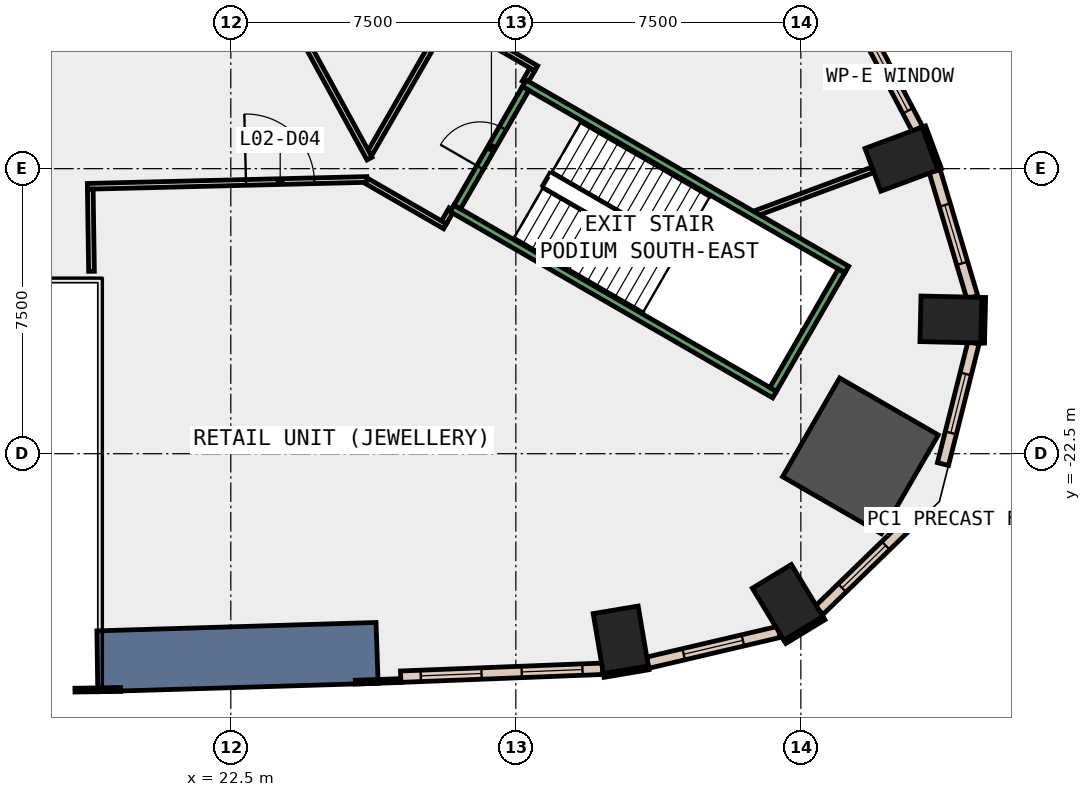
"""IFC4 building model, lengths in metres.
Left out: names, types, materials, properties, quantities, classifications, styles, units other than length and angle.
Written with IfcOpenShell. Run it as: python <this file> out.ifc"""

import sys

from ifc_helpers import new_model, si_unit, direction, frame, frame_2d, origin, origin_2d, place, context, subcontext, project, spatial, polyline, rectangle, outline, extrude, element, fill, save


model = new_model("IFC4")
c1 = context("Model", 3, precision=1e-05, world=origin(), true_north=direction((0.0, 1.0)))
c2 = subcontext(c1, "Body", "Model", "MODEL_VIEW")
j1 = project(units=[si_unit("LENGTHUNIT", "METRE"), si_unit("PLANEANGLEUNIT", "RADIAN")], contexts=[c1])
p1 = place(None, origin())
s1 = spatial("IfcSite", under=j1, at=p1, CompositionType="ELEMENT")
p2 = place(p1, origin())
s2 = spatial("IfcBuilding", under=s1, at=p2, CompositionType="ELEMENT")
p3 = place(p2, frame((0.0, 0.0, 15.0)))
s3 = spatial("IfcBuildingStorey", under=s2, at=p3, CompositionType="ELEMENT", Elevation=15.0)
for number, where, z_axis, x_axis in (
    (1, (32.761, -27.397, -0.45), (0.0, 0.0, 1.0), (0.986, 0.167, 0.0)),
    (2, (37.152, -26.411, -0.45), (0.0, 0.0, 1.0), (0.855, 0.519, 0.0)),
):
    element("IfcColumn", number, at=place(p3, frame(where, z_axis=z_axis, x_axis=x_axis)), inside=s3, PredefinedType="COLUMN", context=c2, shape_type="SweptSolid", body=[
        extrude(rectangle(XDim=1.2, YDim=1.6, at=origin_2d()), origin(), (0.0, 0.0, 1.0), 5.0),
    ])
p4 = place(p3, frame((39.069, -22.556, -0.45), z_axis=(0.0, 0.0, 1.0), x_axis=(-0.866025403784, 0.5, 0.0)))
e3 = element("IfcColumn", 3, at=p4, inside=s3, PredefinedType="COLUMN", context=c2, shape_type="SweptSolid", body=[
    extrude(rectangle(XDim=3.0, YDim=3.0, at=origin_2d()), origin(), (0.0, 0.0, 1.0), 5.0),
])
for number, where, z_axis, x_axis in (
    (4, (41.448, -18.969, -0.45), (0.0, 0.0, 1.0), (0.023, 1.0, 0.0)),
    (5, (40.147, -14.751, -0.45), (0.0, 0.0, 1.0), (-0.348, 0.937, 0.0)),
):
    element("IfcColumn", number, at=place(p3, frame(where, z_axis=z_axis, x_axis=x_axis)), inside=s3, PredefinedType="COLUMN", context=c2, shape_type="SweptSolid", body=[
        extrude(rectangle(XDim=1.2, YDim=1.6, at=origin_2d()), origin(), (0.0, 0.0, 1.0), 5.0),
    ])
p5 = place(p3, frame((0.0, 0.0, -0.45)))
e6 = element("IfcWall", 6, at=p5, inside=s3, PredefinedType="SHEAR", context=c2, shape_type="SweptSolid", body=[
    extrude(outline(polyline([(19.0, -28.762), (26.377, -28.54), (26.321, -26.941), (18.976, -27.162), (19.0, -28.762)])), origin(), (0.0, 0.0, 1.0), 5.0),
])
p6 = place(p3, frame((41.153, -15.018, 0.0), z_axis=(0.0, 0.0, 1.0), x_axis=(-0.348268249601, 0.937394914814, 0.0)))
e7 = element("IfcWall", 7, at=p6, inside=s3, PredefinedType="STANDARD", context=c2, shape_type="SweptSolid", body=[
    extrude(rectangle(XDim=1.2, YDim=0.1, at=frame_2d((0.6, 0.0))), origin(), (0.0, 0.0, 1.0), 4.55),
])
p7 = place(p3, frame((18.399, -28.721, 0.0), z_axis=(0.0, 0.0, 1.0), x_axis=(0.999886724523, 0.015051183404, 0.0)))
e8 = element("IfcWall", 8, at=p7, inside=s3, PredefinedType="STANDARD", context=c2, shape_type="SweptSolid", body=[
    extrude(rectangle(XDim=1.2, YDim=0.1, at=frame_2d((0.6, 0.0))), origin(), (0.0, 0.0, 1.0), 4.55),
])
p8 = place(p3, frame((25.776, -28.511, 0.0), z_axis=(0.0, 0.0, 1.0), x_axis=(0.999387493042, 0.034994838926, 0.0)))
e9 = element("IfcWall", 9, at=p8, inside=s3, PredefinedType="STANDARD", context=c2, shape_type="SweptSolid", body=[
    extrude(rectangle(XDim=1.2, YDim=0.1, at=frame_2d((0.6, 0.0))), origin(), (0.0, 0.0, 1.0), 4.55),
])
p9 = place(p3, frame((32.311, -28.335, 0.0), z_axis=(0.0, 0.0, 1.0), x_axis=(0.986011774526, 0.166675674579, 0.0)))
e10 = element("IfcWall", 10, at=p9, inside=s3, PredefinedType="STANDARD", context=c2, shape_type="SweptSolid", body=[
    extrude(rectangle(XDim=1.2, YDim=0.1, at=frame_2d((0.6, 0.0))), origin(), (0.0, 0.0, 1.0), 4.55),
])
for number, where, z_axis, x_axis in (
    (11, (37.08, -27.449, 0.0), (0.0, 0.0, 1.0), (0.855, 0.519, 0.0)),
    (12, (42.284, -19.588, 0.0), (0.0, 0.0, 1.0), (0.023, 1.0, 0.0)),
):
    element("IfcWall", number, at=place(p3, frame(where, z_axis=z_axis, x_axis=x_axis)), inside=s3, PredefinedType="STANDARD", context=c2, shape_type="SweptSolid", body=[
        extrude(rectangle(XDim=1.2, YDim=0.1, at=frame_2d((0.6, 0.0))), origin(), (0.0, 0.0, 1.0), 4.55),
    ])
p10 = place(p3, frame((26.97, -28.367, 0.0), z_axis=(0.0, 0.0, 1.0), x_axis=(0.999234205654, 0.039128023863, 0.0)))
e13 = element("IfcWall", 13, at=p10, inside=s3, PredefinedType="STANDARD", context=c2, shape_type="SweptSolid", body=[
    extrude(rectangle(XDim=5.316, YDim=0.3, at=frame_2d((2.658, 0.0))), origin(), (0.0, 0.0, 1.0), 4.55),
])
p11 = place(p10, frame((0.529, 0.0, 1.0)))
e14 = element("IfcOpeningElement", 14, at=p11, cuts=e13, PredefinedType="OPENING", context=c2, shape_type="SweptSolid", body=[
    extrude(rectangle(XDim=1.6, YDim=3.2, at=frame_2d((0.8, 1.6))), frame((0.0, 0.16, 0.0), z_axis=(0.0, -1.0, 0.0), x_axis=(1.0, 0.0, 0.0)), (0.0, 0.0, 1.0), 0.32),
])
p12 = place(p10, frame((3.187, 0.0, 1.0)))
e15 = element("IfcOpeningElement", 15, at=p12, cuts=e13, PredefinedType="OPENING", context=c2, shape_type="SweptSolid", body=[
    extrude(rectangle(XDim=1.6, YDim=3.2, at=frame_2d((0.8, 1.6))), frame((0.0, 0.16, 0.0), z_axis=(0.0, -1.0, 0.0), x_axis=(1.0, 0.0, 0.0)), (0.0, 0.0, 1.0), 0.32),
])
p13 = place(p3, frame((33.47, -27.999, 0.0), z_axis=(0.0, 0.0, 1.0), x_axis=(0.97357041301, 0.228387063799, 0.0)))
e16 = element("IfcWall", 16, at=p13, inside=s3, PredefinedType="STANDARD", context=c2, shape_type="SweptSolid", body=[
    extrude(rectangle(XDim=3.547, YDim=0.3, at=frame_2d((1.773, 0.0))), origin(), (0.0, 0.0, 1.0), 4.55),
])
p14 = place(p13, frame((0.973, 0.0, 1.0)))
e17 = element("IfcOpeningElement", 17, at=p14, cuts=e16, PredefinedType="OPENING", context=c2, shape_type="SweptSolid", body=[
    extrude(rectangle(XDim=1.6, YDim=3.2, at=frame_2d((0.8, 1.6))), frame((0.0, 0.16, 0.0), z_axis=(0.0, -1.0, 0.0), x_axis=(1.0, 0.0, 0.0)), (0.0, 0.0, 1.0), 0.32),
])
p15 = place(p3, frame((37.98, -26.621, 0.0), z_axis=(0.0, 0.0, 1.0), x_axis=(0.717527250225, 0.696530433782, 0.0)))
e18 = element("IfcWall", 18, at=p15, inside=s3, PredefinedType="STANDARD", context=c2, shape_type="SweptSolid", body=[
    extrude(rectangle(XDim=3.291, YDim=0.3, at=frame_2d((1.645, 0.0))), origin(), (0.0, 0.0, 1.0), 4.55),
])
p16 = place(p15, frame((0.845, 0.0, 1.0)))
e19 = element("IfcOpeningElement", 19, at=p16, cuts=e18, PredefinedType="OPENING", context=c2, shape_type="SweptSolid", body=[
    extrude(rectangle(XDim=1.6, YDim=3.2, at=frame_2d((0.8, 1.6))), frame((0.0, 0.16, 0.0), z_axis=(0.0, -1.0, 0.0), x_axis=(1.0, 0.0, 0.0)), (0.0, 0.0, 1.0), 0.32),
])
p17 = place(p3, frame((41.24, -22.772, 0.0), z_axis=(0.0, 0.0, 1.0), x_axis=(0.244315836028, 0.969695711172, 0.0)))
e20 = element("IfcWall", 20, at=p17, inside=s3, PredefinedType="STANDARD", context=c2, shape_type="SweptSolid", body=[
    extrude(rectangle(XDim=3.291, YDim=0.3, at=frame_2d((1.645, 0.0))), origin(), (0.0, 0.0, 1.0), 4.55),
])
p18 = place(p17, frame((0.845, 0.0, 1.0)))
e21 = element("IfcOpeningElement", 21, at=p18, cuts=e20, PredefinedType="OPENING", context=c2, shape_type="SweptSolid", body=[
    extrude(rectangle(XDim=1.6, YDim=3.2, at=frame_2d((0.8, 1.6))), frame((0.0, 0.16, 0.0), z_axis=(0.0, -1.0, 0.0), x_axis=(1.0, 0.0, 0.0)), (0.0, 0.0, 1.0), 0.32),
])
p19 = place(p3, frame((42.011, -18.382, 0.0), z_axis=(0.0, 0.0, 1.0), x_axis=(-0.285800575124, 0.958289116738, 0.0)))
e22 = element("IfcWall", 22, at=p19, inside=s3, PredefinedType="STANDARD", context=c2, shape_type="SweptSolid", body=[
    extrude(rectangle(XDim=3.46, YDim=0.3, at=frame_2d((1.73, 0.0))), origin(), (0.0, 0.0, 1.0), 4.55),
])
p20 = place(p19, frame((0.93, 0.0, 1.0)))
e23 = element("IfcOpeningElement", 23, at=p20, cuts=e22, PredefinedType="OPENING", context=c2, shape_type="SweptSolid", body=[
    extrude(rectangle(XDim=1.6, YDim=3.2, at=frame_2d((0.8, 1.6))), frame((0.0, 0.16, 0.0), z_axis=(0.0, -1.0, 0.0), x_axis=(1.0, 0.0, 0.0)), (0.0, 0.0, 1.0), 0.32),
])
p21 = place(p3, frame((40.568, -13.956, 0.0), z_axis=(0.0, 0.0, 1.0), x_axis=(-0.466125129602, 0.884718804792, 0.0)))
e24 = element("IfcWall", 24, at=p21, inside=s3, PredefinedType="STANDARD", context=c2, shape_type="SweptSolid", body=[
    extrude(rectangle(XDim=6.164, YDim=0.3, at=frame_2d((3.082, 0.0))), origin(), (0.0, 0.0, 1.0), 4.55),
])
p22 = place(p21, frame((0.541, 0.0, 1.0)))
e25 = element("IfcOpeningElement", 25, at=p22, cuts=e24, PredefinedType="OPENING", context=c2, shape_type="SweptSolid", body=[
    extrude(rectangle(XDim=2.0, YDim=3.2, at=frame_2d((1.0, 1.6))), frame((0.0, 0.16, 0.0), z_axis=(0.0, -1.0, 0.0), x_axis=(1.0, 0.0, 0.0)), (0.0, 0.0, 1.0), 0.32),
])
p23 = place(p21, frame((3.623, 0.0, 1.0)))
e26 = element("IfcOpeningElement", 26, at=p23, cuts=e24, PredefinedType="OPENING", context=c2, shape_type="SweptSolid", body=[
    extrude(rectangle(XDim=2.0, YDim=3.2, at=frame_2d((1.0, 1.6))), frame((0.0, 0.16, 0.0), z_axis=(0.0, -1.0, 0.0), x_axis=(1.0, 0.0, 0.0)), (0.0, 0.0, 1.0), 0.32),
])
p24 = place(p3, frame((36.334, -16.168, 0.0), z_axis=(0.0, 0.0, 1.0), x_axis=(0.937400028274, 0.348254485961, 0.0)))
e27 = element("IfcWall", 27, at=p24, inside=s3, PredefinedType="PARTITIONING", context=c2, shape_type="SweptSolid", body=[
    extrude(rectangle(XDim=3.247, YDim=0.15, at=frame_2d((1.624, 0.0))), origin(), (0.0, 0.0, 1.0), 4.55),
])
p25 = place(p3, frame((18.726, -15.465, 0.0), z_axis=(0.0, 0.0, 1.0), x_axis=(0.999696822244, 0.02462242057, 0.0)))
e28 = element("IfcWall", 28, at=p25, inside=s3, PredefinedType="PARTITIONING", context=c2, shape_type="SweptSolid", body=[
    extrude(rectangle(XDim=7.357, YDim=0.15, at=frame_2d((3.679, 0.0))), origin(), (0.0, 0.0, 1.0), 4.55),
])
p26 = place(p25, frame((4.175, 0.0, 0.0)))
e29 = element("IfcOpeningElement", 29, at=p26, cuts=e28, PredefinedType="OPENING", context=c2, shape_type="SweptSolid", body=[
    extrude(rectangle(XDim=1.8, YDim=2.1, at=frame_2d((0.9, 1.05))), frame((0.0, 0.085, 0.0), z_axis=(0.0, -1.0, 0.0), x_axis=(1.0, 0.0, 0.0)), (0.0, 0.0, 1.0), 0.17),
])
p27 = place(p3, frame((26.071, -15.323, 0.0), z_axis=(0.0, 0.0, 1.0), x_axis=(0.866182177769, -0.499728361128, 0.0)))
e30 = element("IfcWall", 30, at=p27, inside=s3, PredefinedType="PARTITIONING", context=c2, shape_type="SweptSolid", body=[
    extrude(rectangle(XDim=2.385, YDim=0.15, at=frame_2d((1.192, 0.0))), origin(), (0.0, 0.0, 1.0), 4.55),
])
p28 = place(p3, frame((28.11, -16.413, 0.0), z_axis=(0.0, 0.0, 1.0), x_axis=(0.498310290291, 0.866998762739, 0.0)))
e31 = element("IfcWall", 31, at=p28, inside=s3, PredefinedType="PARTITIONING", context=c2, shape_type="SweptSolid", body=[
    extrude(rectangle(XDim=0.399, YDim=0.15, at=frame_2d((0.2, 0.0))), origin(), (0.0, 0.0, 1.0), 4.55),
])
p29 = place(p3, frame((18.834, -17.7, 0.0), z_axis=(0.0, 0.0, 1.0), x_axis=(-0.014792283123, 0.999890588195, 0.0)))
e32 = element("IfcWall", 32, at=p29, inside=s3, PredefinedType="PARTITIONING", context=c2, shape_type="SweptSolid", body=[
    extrude(rectangle(XDim=2.162, YDim=0.15, at=frame_2d((1.081, 0.0))), origin(), (0.0, 0.0, 1.0), 4.55),
])
p30 = place(p3, frame((30.235, -12.733, 0.0), z_axis=(0.0, 0.0, 1.0), x_axis=(0.499352927503, 0.866398669086, 0.0)))
e33 = element("IfcWall", 33, at=p30, inside=s3, PredefinedType="PARTITIONING", context=c2, shape_type="SweptSolid", body=[
    extrude(rectangle(XDim=0.4, YDim=0.15, at=frame_2d((0.2, 0.0))), origin(), (0.0, 0.0, 1.0), 4.55),
])
p31 = place(p3, frame((30.537, -12.358, 0.0), z_axis=(0.0, 0.0, 1.0), x_axis=(-0.866108986466, 0.499855202596, 0.0)))
e34 = element("IfcWall", 34, at=p31, inside=s3, PredefinedType="PARTITIONING", context=c2, shape_type="SweptSolid", body=[
    extrude(rectangle(XDim=2.6, YDim=0.15, at=frame_2d((1.3, 0.0))), origin(), (0.0, 0.0, 1.0), 4.55),
])
p32 = place(p3, frame((28.257, -10.956, 0.0), z_axis=(0.0, 0.0, 1.0), x_axis=(-0.500010096862, -0.86601957428, 0.0)))
e35 = element("IfcWall", 35, at=p32, inside=s3, PredefinedType="PARTITIONING", context=c2, shape_type="SweptSolid", body=[
    extrude(rectangle(XDim=4.212, YDim=0.15, at=frame_2d((2.106, 0.0))), origin(), (0.0, 0.0, 1.0), 4.55),
])
p33 = place(p3, frame((26.15, -14.735, 0.0), z_axis=(0.0, 0.0, 1.0), x_axis=(-0.480144660377, 0.877189321134, 0.0)))
e36 = element("IfcWall", 36, at=p33, inside=s3, PredefinedType="PARTITIONING", context=c2, shape_type="SweptSolid", body=[
    extrude(rectangle(XDim=7.183, YDim=0.15, at=frame_2d((3.592, 0.0))), origin(), (0.0, 0.0, 1.0), 4.55),
])
p34 = place(p33, frame((5.183, 0.0, 0.0)))
e37 = element("IfcOpeningElement", 37, at=p34, cuts=e36, PredefinedType="OPENING", context=c2, shape_type="SweptSolid", body=[
    extrude(rectangle(XDim=1.8, YDim=2.1, at=frame_2d((0.9, 1.05))), frame((0.0, 0.085, 0.0), z_axis=(0.0, -1.0, 0.0), x_axis=(1.0, 0.0, 0.0)), (0.0, 0.0, 1.0), 0.17),
])
for number, where, z_axis, x_axis in (
    (38, (28.322, -16.045, 0.0), (0.0, 0.0, 1.0), (0.866, -0.5, 0.0)),
    (39, (30.222, -12.755, 0.0), (0.0, 0.0, 1.0), (0.866, -0.5, 0.0)),
):
    element("IfcWall", number, at=place(p3, frame(where, z_axis=z_axis, x_axis=x_axis)), inside=s3, PredefinedType="STANDARD", context=c2, shape_type="SweptSolid", body=[
        extrude(rectangle(XDim=9.8, YDim=0.2, at=frame_2d((4.9, 0.0))), origin(), (0.0, 0.0, 1.0), 4.55),
    ])
p35 = place(p3, frame((28.458, -16.009, 0.0), z_axis=(0.0, 0.0, 1.0), x_axis=(0.499982693035, 0.866035395735, 0.0)))
e40 = element("IfcWall", 40, at=p35, inside=s3, PredefinedType="STANDARD", context=c2, shape_type="SweptSolid", body=[
    extrude(rectangle(XDim=3.6, YDim=0.2, at=frame_2d((1.8, 0.0))), origin(), (0.0, 0.0, 1.0), 4.55),
])
p36 = place(p35, frame((1.2, 0.0, 0.0)))
e41 = element("IfcOpeningElement", 41, at=p36, cuts=e40, PredefinedType="OPENING", context=c2, shape_type="SweptSolid", body=[
    extrude(rectangle(XDim=1.2, YDim=2.2, at=frame_2d((0.6, 1.1))), frame((0.0, 0.11, 0.0), z_axis=(0.0, -1.0, 0.0), x_axis=(1.0, 0.0, 0.0)), (0.0, 0.0, 1.0), 0.22),
])
p37 = place(p3, frame((36.772, -20.809, 0.0), z_axis=(0.0, 0.0, 1.0), x_axis=(0.49995333141, 0.866052346231, 0.0)))
e42 = element("IfcWall", 42, at=p37, inside=s3, PredefinedType="STANDARD", context=c2, shape_type="SweptSolid", body=[
    extrude(rectangle(XDim=3.6, YDim=0.2, at=frame_2d((1.8, 0.0))), origin(), (0.0, 0.0, 1.0), 4.55),
])
p38 = place(p11, origin())
e43 = element("IfcWindow", 43, at=p38, inside=s3, PartitioningType="SINGLE_PANEL", PredefinedType="WINDOW", context=c2, shape_type="SweptSolid", body=[
    extrude(rectangle(XDim=1.6, YDim=3.2, at=frame_2d((0.8, 1.6))), frame((0.0, 0.03, 0.0), z_axis=(0.0, -1.0, 0.0), x_axis=(1.0, 0.0, 0.0)), (0.0, 0.0, 1.0), 0.06),
])
fill(e14, e43)
p39 = place(p12, origin())
e44 = element("IfcWindow", 44, at=p39, inside=s3, PartitioningType="SINGLE_PANEL", PredefinedType="WINDOW", context=c2, shape_type="SweptSolid", body=[
    extrude(rectangle(XDim=1.6, YDim=3.2, at=frame_2d((0.8, 1.6))), frame((0.0, 0.03, 0.0), z_axis=(0.0, -1.0, 0.0), x_axis=(1.0, 0.0, 0.0)), (0.0, 0.0, 1.0), 0.06),
])
fill(e15, e44)
p40 = place(p14, origin())
e45 = element("IfcWindow", 45, at=p40, inside=s3, PartitioningType="SINGLE_PANEL", PredefinedType="WINDOW", context=c2, shape_type="SweptSolid", body=[
    extrude(rectangle(XDim=1.6, YDim=3.2, at=frame_2d((0.8, 1.6))), frame((0.0, 0.03, 0.0), z_axis=(0.0, -1.0, 0.0), x_axis=(1.0, 0.0, 0.0)), (0.0, 0.0, 1.0), 0.06),
])
fill(e17, e45)
p41 = place(p16, origin())
e46 = element("IfcWindow", 46, at=p41, inside=s3, PartitioningType="SINGLE_PANEL", PredefinedType="WINDOW", context=c2, shape_type="SweptSolid", body=[
    extrude(rectangle(XDim=1.6, YDim=3.2, at=frame_2d((0.8, 1.6))), frame((0.0, 0.03, 0.0), z_axis=(0.0, -1.0, 0.0), x_axis=(1.0, 0.0, 0.0)), (0.0, 0.0, 1.0), 0.06),
])
fill(e19, e46)
p42 = place(p18, origin())
e47 = element("IfcWindow", 47, at=p42, inside=s3, PartitioningType="SINGLE_PANEL", PredefinedType="WINDOW", context=c2, shape_type="SweptSolid", body=[
    extrude(rectangle(XDim=1.6, YDim=3.2, at=frame_2d((0.8, 1.6))), frame((0.0, 0.03, 0.0), z_axis=(0.0, -1.0, 0.0), x_axis=(1.0, 0.0, 0.0)), (0.0, 0.0, 1.0), 0.06),
])
fill(e21, e47)
p43 = place(p20, origin())
e48 = element("IfcWindow", 48, at=p43, inside=s3, PartitioningType="SINGLE_PANEL", PredefinedType="WINDOW", context=c2, shape_type="SweptSolid", body=[
    extrude(rectangle(XDim=1.6, YDim=3.2, at=frame_2d((0.8, 1.6))), frame((0.0, 0.03, 0.0), z_axis=(0.0, -1.0, 0.0), x_axis=(1.0, 0.0, 0.0)), (0.0, 0.0, 1.0), 0.06),
])
fill(e23, e48)
p44 = place(p22, origin())
e49 = element("IfcWindow", 49, at=p44, inside=s3, PartitioningType="SINGLE_PANEL", PredefinedType="WINDOW", context=c2, shape_type="SweptSolid", body=[
    extrude(rectangle(XDim=2.0, YDim=3.2, at=frame_2d((1.0, 1.6))), frame((0.0, 0.03, 0.0), z_axis=(0.0, -1.0, 0.0), x_axis=(1.0, 0.0, 0.0)), (0.0, 0.0, 1.0), 0.06),
])
fill(e25, e49)
p45 = place(p26, origin())
e50 = element("IfcDoor", 50, at=p45, inside=s3, OperationType="DOUBLE_DOOR_SINGLE_SWING", PredefinedType="DOOR", context=c2, shape_type="SweptSolid", body=[
    extrude(rectangle(XDim=1.8, YDim=2.1, at=frame_2d((0.9, 1.05))), frame((0.0, 0.025, 0.0), z_axis=(0.0, -1.0, 0.0), x_axis=(1.0, 0.0, 0.0)), (0.0, 0.0, 1.0), 0.05),
])
fill(e29, e50)
p46 = place(p36, origin())
e51 = element("IfcDoor", 51, at=p46, inside=s3, OperationType="SINGLE_SWING_LEFT", PredefinedType="DOOR", context=c2, shape_type="SweptSolid", body=[
    extrude(rectangle(XDim=1.2, YDim=2.2, at=frame_2d((0.6, 1.1))), frame((0.0, 0.025, 0.0), z_axis=(0.0, -1.0, 0.0), x_axis=(1.0, 0.0, 0.0)), (0.0, 0.0, 1.0), 0.05),
])
fill(e41, e51)
save(model, sys.argv[1])
